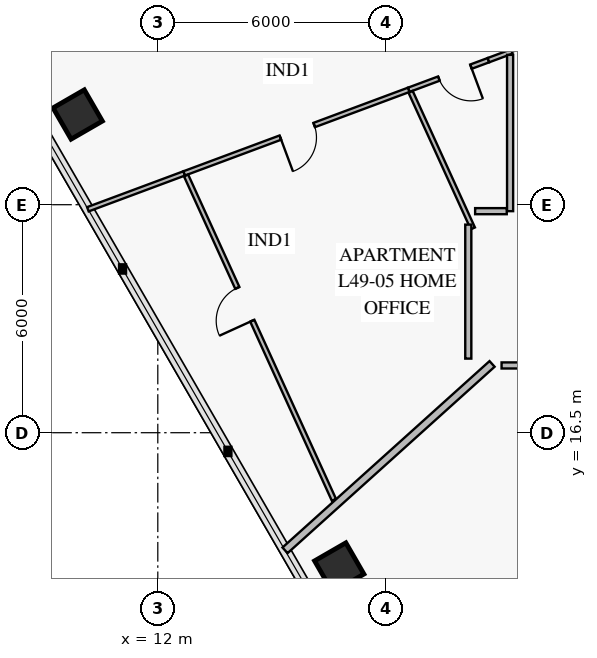
"""IFC4 building model, lengths in metres.
Left out: names, types, materials, properties, quantities, classifications, styles, units other than length and angle.
Written with IfcOpenShell. Run it as: python <this file> out.ifc"""

import sys

from ifc_helpers import new_model, si_unit, direction, frame, frame_2d, origin, origin_2d, place, context, subcontext, project, spatial, rectangle, extrude, element, fill, save


model = new_model("IFC4")
c1 = context("Model", 3, precision=1e-05, world=origin(), true_north=direction((0.0, 1.0)))
c2 = subcontext(c1, "Body", "Model", "MODEL_VIEW")
j1 = project(units=[si_unit("LENGTHUNIT", "METRE"), si_unit("PLANEANGLEUNIT", "RADIAN")], contexts=[c1])
p1 = place(None, origin())
s1 = spatial("IfcSite", under=j1, at=p1, CompositionType="ELEMENT")
p2 = place(p1, origin())
s2 = spatial("IfcBuilding", under=s1, at=p2, CompositionType="ELEMENT")
p3 = place(p2, frame((0.0, 0.0, 196.0)))
s3 = spatial("IfcBuildingStorey", under=s2, at=p3, CompositionType="ELEMENT", Elevation=196.0)
for number, where, z_axis, x_axis in (
    (1, (9.892, 24.874, 0.0), (0.0, 0.0, 1.0), (0.5, -0.866, 0.0)),
    (2, (16.774, 12.953, 0.0), (0.0, 0.0, 1.0), (0.5, -0.866, 0.0)),
):
    element("IfcColumn", number, at=place(p3, frame(where, z_axis=z_axis, x_axis=x_axis)), inside=s3, PredefinedType="COLUMN", context=c2, shape_type="SweptSolid", body=[
        extrude(rectangle(XDim=0.95, YDim=0.95, at=origin_2d()), origin(), (0.0, 0.0, 1.0), 3.55),
    ])
p4 = place(p3, frame((20.7, 26.304, 0.0), z_axis=(0.0, 0.0, 1.0), x_axis=(-0.937146429419, -0.34893634065, 0.0)))
e3 = element("IfcWall", 3, at=p4, inside=s3, PredefinedType="PARTITIONING", context=c2, shape_type="SweptSolid", body=[
    extrude(rectangle(XDim=2.24, YDim=0.12, at=frame_2d((1.12, 0.0))), origin(), (0.0, 0.0, 1.0), 3.55),
])
p5 = place(p4, frame((0.49, 0.0, 0.0)))
e4 = element("IfcOpeningElement", 4, at=p5, cuts=e3, PredefinedType="OPENING", context=c2, shape_type="SweptSolid", body=[
    extrude(rectangle(XDim=0.9, YDim=2.1, at=frame_2d((0.45, 1.05))), frame((0.0, 0.072, 0.0), z_axis=(0.0, -1.0, 0.0), x_axis=(1.0, 0.0, 0.0)), (0.0, 0.0, 1.0), 0.144),
])
p6 = place(p3, frame((18.601, 25.522, 0.0), z_axis=(0.0, 0.0, 1.0), x_axis=(-0.937158847228, -0.348902988039, 0.0)))
e5 = element("IfcWall", 5, at=p6, inside=s3, PredefinedType="PARTITIONING", context=c2, shape_type="SweptSolid", body=[
    extrude(rectangle(XDim=6.305, YDim=0.12, at=frame_2d((3.152, 0.0))), origin(), (0.0, 0.0, 1.0), 3.15),
])
p7 = place(p6, frame((2.652, 0.0, 0.0)))
e6 = element("IfcOpeningElement", 6, at=p7, cuts=e5, PredefinedType="OPENING", context=c2, shape_type="SweptSolid", body=[
    extrude(rectangle(XDim=0.95, YDim=2.1, at=frame_2d((0.475, 1.05))), frame((0.0, 0.072, 0.0), z_axis=(0.0, -1.0, 0.0), x_axis=(1.0, 0.0, 0.0)), (0.0, 0.0, 1.0), 0.144),
])
p8 = place(p3, frame((12.744, 23.27, 0.0), z_axis=(0.0, 0.0, 1.0), x_axis=(0.414714516526, -0.909951575515, 0.0)))
e7 = element("IfcWall", 7, at=p8, inside=s3, PredefinedType="PARTITIONING", context=c2, shape_type="SweptSolid", body=[
    extrude(rectangle(XDim=9.381, YDim=0.12, at=frame_2d((4.69, 0.0))), origin(), (0.0, 0.0, 1.0), 3.55),
])
p9 = place(p8, frame((3.251, 0.0, 0.0)))
e8 = element("IfcOpeningElement", 8, at=p9, cuts=e7, PredefinedType="OPENING", context=c2, shape_type="SweptSolid", body=[
    extrude(rectangle(XDim=0.95, YDim=2.1, at=frame_2d((0.475, 1.05))), frame((0.0, 0.072, 0.0), z_axis=(0.0, -1.0, 0.0), x_axis=(1.0, 0.0, 0.0)), (0.0, 0.0, 1.0), 0.144),
])
p10 = place(p3, frame((21.046, 18.27, 0.0), z_axis=(0.0, 0.0, 1.0), x_axis=(1.0, 0.0, 0.0)))
e9 = element("IfcWall", 9, at=p10, inside=s3, PredefinedType="PARTITIONING", context=c2, shape_type="SweptSolid", body=[
    extrude(rectangle(XDim=5.648, YDim=0.16, at=frame_2d((2.824, 0.0))), origin(), (0.0, 0.0, 1.0), 2.9),
])
p11 = place(p10, frame((2.299, 0.0, 0.0)))
e10 = element("IfcOpeningElement", 10, at=p11, cuts=e9, PredefinedType="OPENING", context=c2, shape_type="SweptSolid", body=[
    extrude(rectangle(XDim=1.05, YDim=2.15, at=frame_2d((0.525, 1.075))), frame((0.0, 0.092, 0.0), z_axis=(0.0, -1.0, 0.0), x_axis=(1.0, 0.0, 0.0)), (0.0, 0.0, 1.0), 0.184),
])
p12 = place(p3, frame((21.313, 26.532, 0.0), z_axis=(0.0, 0.0, 1.0), x_axis=(-0.937230355165, -0.348710856379, 0.0)))
e11 = element("IfcWall", 11, at=p12, inside=s3, PredefinedType="PARTITIONING", context=c2, shape_type="SweptSolid", body=[
    extrude(rectangle(XDim=0.655, YDim=0.12, at=frame_2d((0.327, 0.0))), origin(), (0.0, 0.0, 1.0), 3.55),
])
p13 = place(p3, frame((12.693, 23.323, 0.0), z_axis=(0.0, 0.0, 1.0), x_axis=(-0.937173079669, -0.348864757096, 0.0)))
e12 = element("IfcWall", 12, at=p13, inside=s3, PredefinedType="PARTITIONING", context=c2, shape_type="SweptSolid", body=[
    extrude(rectangle(XDim=2.702, YDim=0.12, at=frame_2d((1.351, 0.0))), origin(), (0.0, 0.0, 1.0), 2.87),
])
p14 = place(p3, frame((18.653, 25.469, 0.0), z_axis=(0.0, 0.0, 1.0), x_axis=(0.41474383849, -0.909938211328, 0.0)))
e13 = element("IfcWall", 13, at=p14, inside=s3, PredefinedType="PARTITIONING", context=c2, shape_type="SweptSolid", body=[
    extrude(rectangle(XDim=3.948, YDim=0.12, at=frame_2d((1.974, 0.0))), origin(), (0.0, 0.0, 1.0), 3.55),
])
p15 = place(p3, frame((20.796, 18.31, 0.0), z_axis=(0.0, 0.0, 1.0), x_axis=(-0.743136814575, -0.66913950326, 0.0)))
e14 = element("IfcWall", 14, at=p15, inside=s3, PredefinedType="PARTITIONING", context=c2, shape_type="SweptSolid", body=[
    extrude(rectangle(XDim=7.331, YDim=0.2, at=frame_2d((3.666, 0.0))), origin(), (0.0, 0.0, 1.0), 2.87),
])
p16 = place(p3, frame((25.201, 16.026, 0.0), z_axis=(0.0, 0.0, 1.0), x_axis=(-0.560066581078, -0.828447599284, 0.0)))
e15 = element("IfcWall", 15, at=p16, inside=s3, PredefinedType="PARTITIONING", context=c2, shape_type="SweptSolid", body=[
    extrude(rectangle(XDim=10.958, YDim=0.12, at=frame_2d((5.479, 0.0))), origin(), (0.0, 0.0, 1.0), 2.87),
])
p17 = place(p3, frame((21.27, 26.444, 0.0), z_axis=(0.0, 0.0, 1.0), x_axis=(0.0, -1.0, 0.0)))
e16 = element("IfcWall", 16, at=p17, inside=s3, PredefinedType="PARTITIONING", context=c2, shape_type="SweptSolid", body=[
    extrude(rectangle(XDim=4.114, YDim=0.16, at=frame_2d((2.057, 0.0))), origin(), (0.0, 0.0, 1.0), 3.55),
])
p18 = place(p3, frame((21.182, 22.33, 0.0), z_axis=(0.0, 0.0, 1.0), x_axis=(-1.0, 0.0, 0.0)))
e17 = element("IfcWall", 17, at=p18, inside=s3, PredefinedType="PARTITIONING", context=c2, shape_type="SweptSolid", body=[
    extrude(rectangle(XDim=0.832, YDim=0.16, at=frame_2d((0.416, 0.0))), origin(), (0.0, 0.0, 1.0), 3.55),
])
p19 = place(p3, frame((20.17, 21.976, 0.0), z_axis=(0.0, 0.0, 1.0), x_axis=(0.0, -1.0, 0.0)))
e18 = element("IfcWall", 18, at=p19, inside=s3, PredefinedType="PARTITIONING", context=c2, shape_type="SweptSolid", body=[
    extrude(rectangle(XDim=3.526, YDim=0.16, at=frame_2d((1.763, 0.0))), origin(), (0.0, 0.0, 1.0), 3.15),
])
p20 = place(p5, origin())
e19 = element("IfcDoor", 19, at=p20, inside=s3, OperationType="SINGLE_SWING_LEFT", PredefinedType="DOOR", context=c2, shape_type="SweptSolid", body=[
    extrude(rectangle(XDim=0.9, YDim=2.1, at=frame_2d((0.45, 1.05))), frame((0.0, 0.025, 0.0), z_axis=(0.0, -1.0, 0.0), x_axis=(1.0, 0.0, 0.0)), (0.0, 0.0, 1.0), 0.05),
])
fill(e4, e19)
p21 = place(p7, origin())
e20 = element("IfcDoor", 20, at=p21, inside=s3, OperationType="SINGLE_SWING_RIGHT", PredefinedType="DOOR", context=c2, shape_type="SweptSolid", body=[
    extrude(rectangle(XDim=0.95, YDim=2.1, at=frame_2d((0.475, 1.05))), frame((0.0, 0.025, 0.0), z_axis=(0.0, -1.0, 0.0), x_axis=(1.0, 0.0, 0.0)), (0.0, 0.0, 1.0), 0.05),
])
fill(e6, e20)
p22 = place(p9, frame((0.95, 0.0, 0.0), z_axis=(0.0, 0.0, 1.0), x_axis=(-1.0, 0.0, 0.0)))
e21 = element("IfcDoor", 21, at=p22, inside=s3, OperationType="SINGLE_SWING_LEFT", PredefinedType="DOOR", context=c2, shape_type="SweptSolid", body=[
    extrude(rectangle(XDim=0.95, YDim=2.1, at=frame_2d((0.475, 1.05))), frame((0.0, 0.025, 0.0), z_axis=(0.0, -1.0, 0.0), x_axis=(1.0, 0.0, 0.0)), (0.0, 0.0, 1.0), 0.05),
])
fill(e8, e21)
save(model, sys.argv[1])
